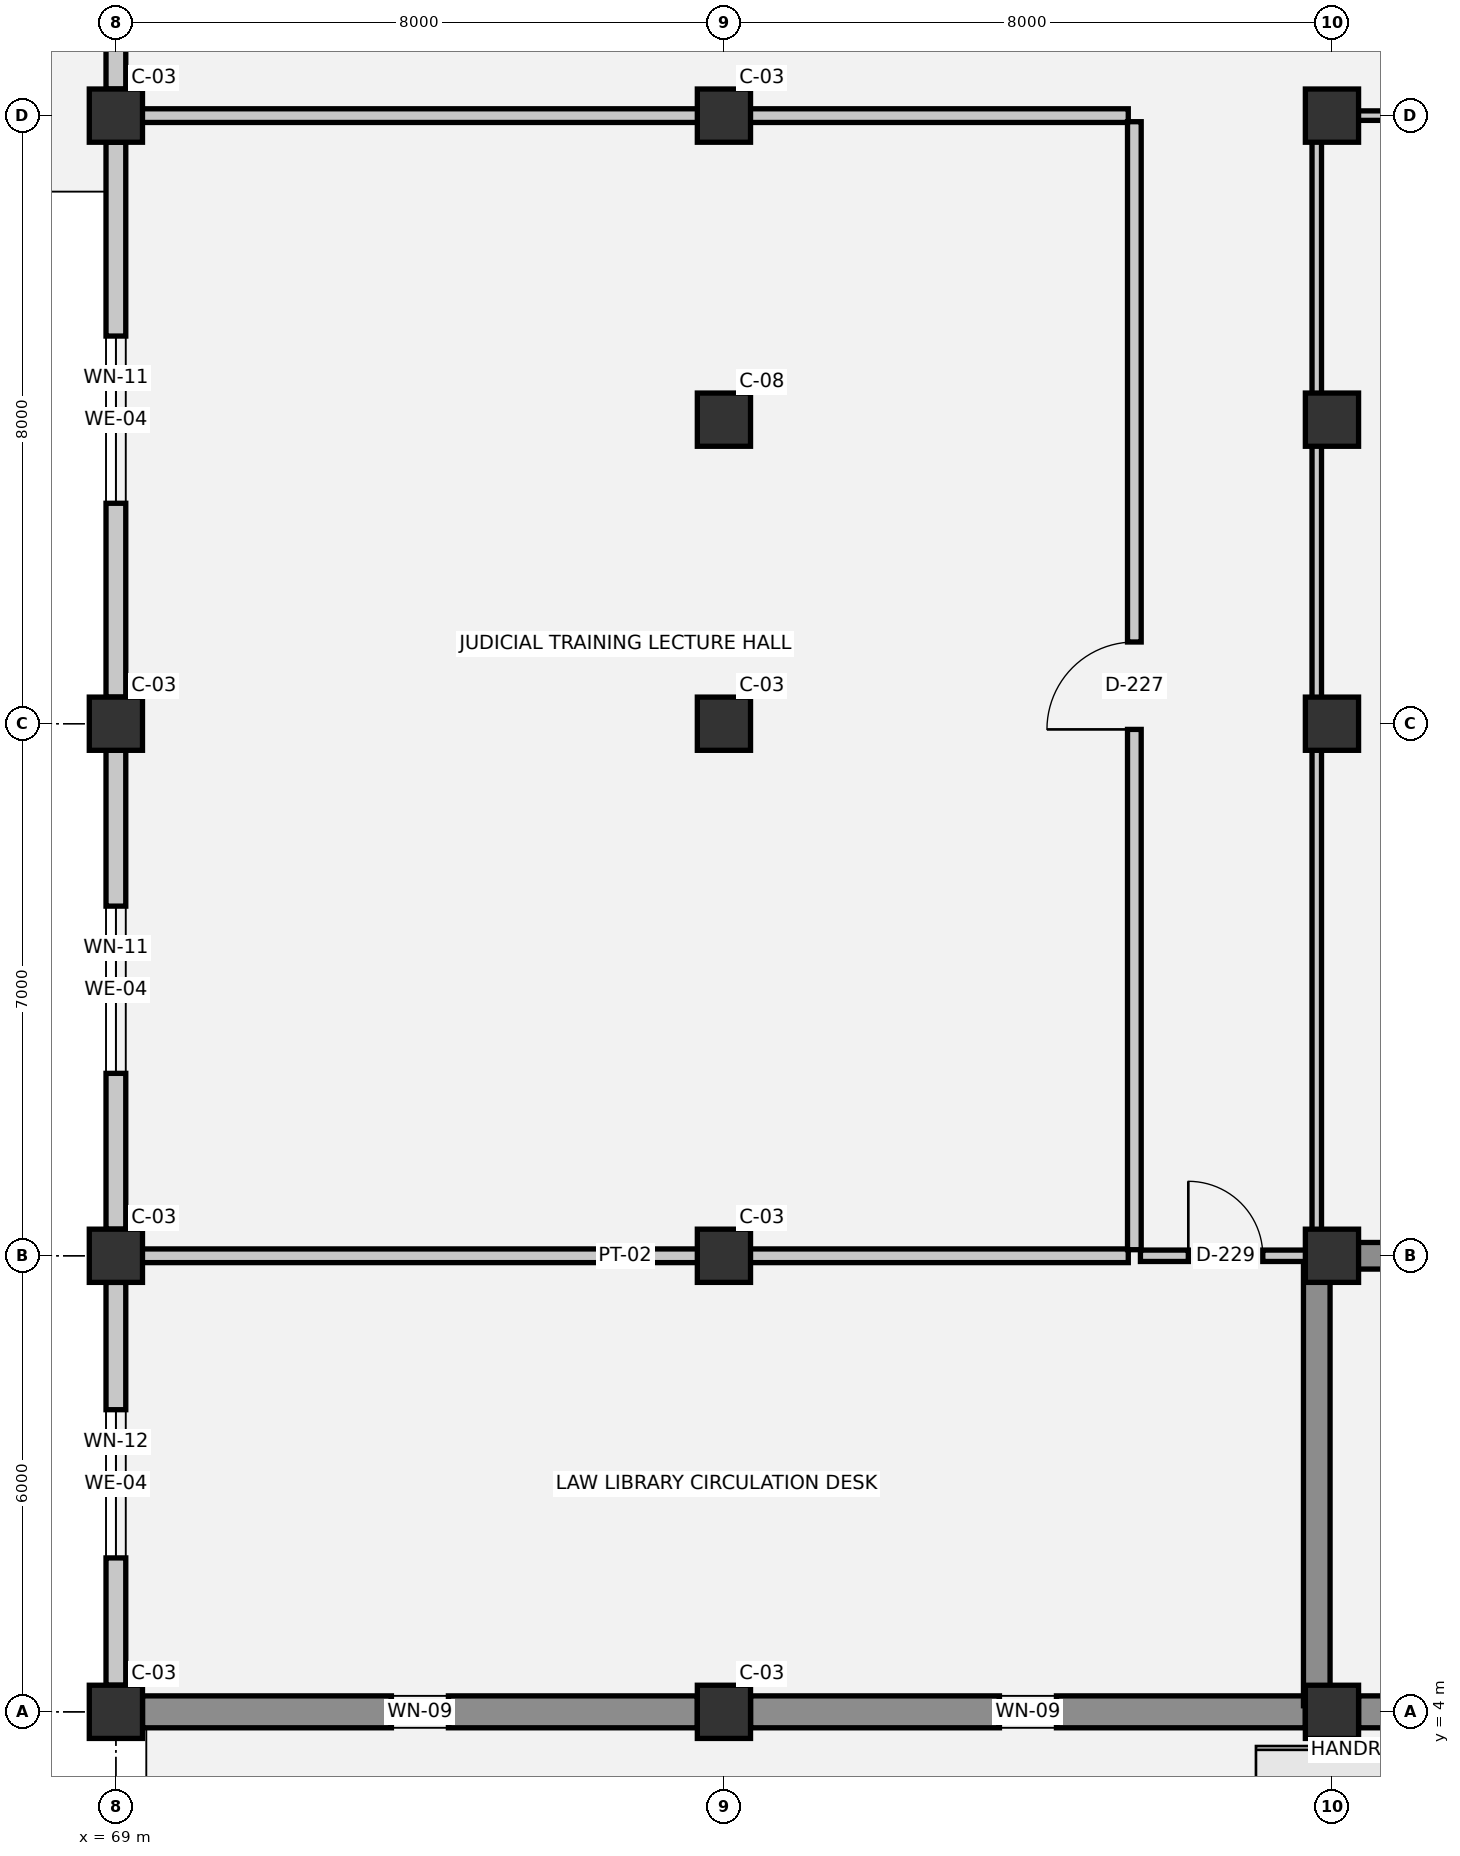
"""IFC4 building model, lengths in metres.
Left out: names, types, materials, properties, quantities, classifications, styles, units other than length and angle.
Written with IfcOpenShell. Run it as: python <this file> out.ifc"""

import sys

from ifc_helpers import new_model, si_unit, direction, frame, frame_2d, origin, origin_2d, place, context, subcontext, project, spatial, rectangle, circle, extrude, element, fill, save


model = new_model("IFC4")
c1 = context("Model", 3, precision=1e-05, world=origin(), true_north=direction((0.0, 1.0)))
c2 = subcontext(c1, "Body", "Model", "MODEL_VIEW")
j1 = project(units=[si_unit("LENGTHUNIT", "METRE"), si_unit("PLANEANGLEUNIT", "RADIAN")], contexts=[c1])
p1 = place(None, origin())
s1 = spatial("IfcSite", under=j1, at=p1, CompositionType="ELEMENT")
p2 = place(p1, origin())
s2 = spatial("IfcBuilding", under=s1, at=p2, CompositionType="ELEMENT")
p3 = place(p2, origin())
s3 = spatial("IfcBuildingStorey", under=s2, at=p3, CompositionType="ELEMENT", Elevation=0.0)
for number, where, z_axis, x_axis in (
    (1, (69.0, 4.0, 0.0), (0.0, 0.0, 1.0), (1.0, 0.0, 0.0)),
    (2, (69.0, 10.0, 0.0), (0.0, 0.0, 1.0), (1.0, 0.0, 0.0)),
    (3, (69.0, 17.0, 0.0), (0.0, 0.0, 1.0), (1.0, 0.0, 0.0)),
    (4, (69.0, 25.0, 0.0), (0.0, 0.0, 1.0), (1.0, 0.0, 0.0)),
    (5, (77.0, 4.0, 0.0), (0.0, 0.0, 1.0), (1.0, 0.0, 0.0)),
    (6, (77.0, 10.0, 0.0), (0.0, 0.0, 1.0), (1.0, 0.0, 0.0)),
    (7, (77.0, 17.0, 0.0), (0.0, 0.0, 1.0), (1.0, 0.0, 0.0)),
    (8, (77.0, 25.0, 0.0), (0.0, 0.0, 1.0), (1.0, 0.0, 0.0)),
    (9, (85.0, 4.0, 0.0), (0.0, 0.0, 1.0), (1.0, 0.0, 0.0)),
    (10, (85.0, 10.0, 0.0), (0.0, 0.0, 1.0), (1.0, 0.0, 0.0)),
    (11, (85.0, 17.0, 0.0), (0.0, 0.0, 1.0), (1.0, 0.0, 0.0)),
    (12, (85.0, 25.0, 0.0), (0.0, 0.0, 1.0), (1.0, 0.0, 0.0)),
):
    element("IfcColumn", number, at=place(p3, frame(where, z_axis=z_axis, x_axis=x_axis)), inside=s3, PredefinedType="COLUMN", context=c2, shape_type="SweptSolid", body=[
        extrude(rectangle(XDim=0.7, YDim=0.7, at=origin_2d()), origin(), (0.0, 0.0, 1.0), 5.4),
    ])
for number, where, z_axis, x_axis in (
    (13, (77.0, 21.0, 0.0), (0.0, 0.0, 1.0), (1.0, 0.0, 0.0)),
    (14, (85.0, 21.0, 0.0), (0.0, 0.0, 1.0), (1.0, 0.0, 0.0)),
):
    element("IfcColumn", number, at=place(p3, frame(where, z_axis=z_axis, x_axis=x_axis)), inside=s3, PredefinedType="COLUMN", context=c2, shape_type="SweptSolid", body=[
        extrude(circle(Radius=0.35, at=origin_2d()), origin(), (0.0, 0.0, 1.0), 5.4),
    ])
p4 = place(p3, frame((69.0, 4.35, 0.0), z_axis=(0.0, 0.0, 1.0), x_axis=(0.0, 1.0, 0.0)))
e15 = element("IfcWall", 15, at=p4, inside=s3, PredefinedType="SOLIDWALL", context=c2, shape_type="SweptSolid", body=[
    extrude(rectangle(XDim=5.3, YDim=0.26, at=frame_2d((2.65, 0.0))), origin(), (0.0, 0.0, 1.0), 4.34),
])
p5 = place(p4, frame((1.675, 0.0, 0.9)))
e16 = element("IfcOpeningElement", 16, at=p5, cuts=e15, PredefinedType="OPENING", context=c2, shape_type="SweptSolid", body=[
    extrude(rectangle(XDim=1.95, YDim=1.85, at=frame_2d((0.975, 0.925))), frame((0.0, 0.14, 0.0), z_axis=(0.0, -1.0, 0.0), x_axis=(1.0, 0.0, 0.0)), (0.0, 0.0, 1.0), 0.28),
])
p6 = place(p3, frame((69.0, 10.35, 0.0), z_axis=(0.0, 0.0, 1.0), x_axis=(0.0, 1.0, 0.0)))
e17 = element("IfcWall", 17, at=p6, inside=s3, PredefinedType="SOLIDWALL", context=c2, shape_type="SweptSolid", body=[
    extrude(rectangle(XDim=6.3, YDim=0.26, at=frame_2d((3.15, 0.0))), origin(), (0.0, 0.0, 1.0), 4.34),
])
p7 = place(p6, frame((2.05, 0.0, 0.9)))
e18 = element("IfcOpeningElement", 18, at=p7, cuts=e17, PredefinedType="OPENING", context=c2, shape_type="SweptSolid", body=[
    extrude(rectangle(XDim=2.2, YDim=1.9, at=frame_2d((1.1, 0.95))), frame((0.0, 0.14, 0.0), z_axis=(0.0, -1.0, 0.0), x_axis=(1.0, 0.0, 0.0)), (0.0, 0.0, 1.0), 0.28),
])
p8 = place(p3, frame((69.0, 17.35, 0.0), z_axis=(0.0, 0.0, 1.0), x_axis=(0.0, 1.0, 0.0)))
e19 = element("IfcWall", 19, at=p8, inside=s3, PredefinedType="SOLIDWALL", context=c2, shape_type="SweptSolid", body=[
    extrude(rectangle(XDim=7.3, YDim=0.26, at=frame_2d((3.65, 0.0))), origin(), (0.0, 0.0, 1.0), 4.34),
])
p9 = place(p8, frame((2.55, 0.0, 0.9)))
e20 = element("IfcOpeningElement", 20, at=p9, cuts=e19, PredefinedType="OPENING", context=c2, shape_type="SweptSolid", body=[
    extrude(rectangle(XDim=2.2, YDim=1.9, at=frame_2d((1.1, 0.95))), frame((0.0, 0.14, 0.0), z_axis=(0.0, -1.0, 0.0), x_axis=(1.0, 0.0, 0.0)), (0.0, 0.0, 1.0), 0.28),
])
p10 = place(p3, frame((69.0, 25.35, 0.0), z_axis=(0.0, 0.0, 1.0), x_axis=(0.0, 1.0, 0.0)))
e21 = element("IfcWall", 21, at=p10, inside=s3, PredefinedType="SOLIDWALL", context=c2, shape_type="SweptSolid", body=[
    extrude(rectangle(XDim=6.3, YDim=0.26, at=frame_2d((3.15, 0.0))), origin(), (0.0, 0.0, 1.0), 4.34),
])
p11 = place(p10, frame((1.95, 0.0, 0.0)))
e22 = element("IfcOpeningElement", 22, at=p11, cuts=e21, PredefinedType="OPENING", context=c2, shape_type="SweptSolid", body=[
    extrude(rectangle(XDim=2.4, YDim=2.4, at=frame_2d((1.2, 1.2))), frame((0.0, 0.14, 0.0), z_axis=(0.0, -1.0, 0.0), x_axis=(1.0, 0.0, 0.0)), (0.0, 0.0, 1.0), 0.28),
])
p12 = place(p3, frame((92.65, 4.0, 0.0), z_axis=(0.0, 0.0, 1.0), x_axis=(-1.0, 0.0, 0.0)))
e23 = element("IfcWall", 23, at=p12, inside=s3, PredefinedType="SOLIDWALL", context=c2, shape_type="SweptSolid", body=[
    extrude(rectangle(XDim=7.3, YDim=0.42, at=frame_2d((3.65, 0.0))), origin(), (0.0, 0.0, 1.0), 4.34),
])
p13 = place(p12, frame((3.275, 0.0, 0.9)))
e24 = element("IfcOpeningElement", 24, at=p13, cuts=e23, PredefinedType="OPENING", context=c2, shape_type="SweptSolid", body=[
    extrude(rectangle(XDim=0.75, YDim=2.2, at=frame_2d((0.375, 1.1))), frame((0.0, 0.22, 0.0), z_axis=(0.0, -1.0, 0.0), x_axis=(1.0, 0.0, 0.0)), (0.0, 0.0, 1.0), 0.44),
])
p14 = place(p3, frame((84.65, 4.0, 0.0), z_axis=(0.0, 0.0, 1.0), x_axis=(-1.0, 0.0, 0.0)))
e25 = element("IfcWall", 25, at=p14, inside=s3, PredefinedType="SOLIDWALL", context=c2, shape_type="SweptSolid", body=[
    extrude(rectangle(XDim=7.3, YDim=0.42, at=frame_2d((3.65, 0.0))), origin(), (0.0, 0.0, 1.0), 4.34),
])
p15 = place(p14, frame((3.275, 0.0, 0.9)))
e26 = element("IfcOpeningElement", 26, at=p15, cuts=e25, PredefinedType="OPENING", context=c2, shape_type="SweptSolid", body=[
    extrude(rectangle(XDim=0.75, YDim=2.2, at=frame_2d((0.375, 1.1))), frame((0.0, 0.22, 0.0), z_axis=(0.0, -1.0, 0.0), x_axis=(1.0, 0.0, 0.0)), (0.0, 0.0, 1.0), 0.44),
])
p16 = place(p3, frame((76.65, 4.0, 0.0), z_axis=(0.0, 0.0, 1.0), x_axis=(-1.0, 0.0, 0.0)))
e27 = element("IfcWall", 27, at=p16, inside=s3, PredefinedType="SOLIDWALL", context=c2, shape_type="SweptSolid", body=[
    extrude(rectangle(XDim=7.3, YDim=0.42, at=frame_2d((3.65, 0.0))), origin(), (0.0, 0.0, 1.0), 4.34),
])
p17 = place(p16, frame((3.275, 0.0, 0.9)))
e28 = element("IfcOpeningElement", 28, at=p17, cuts=e27, PredefinedType="OPENING", context=c2, shape_type="SweptSolid", body=[
    extrude(rectangle(XDim=0.75, YDim=2.2, at=frame_2d((0.375, 1.1))), frame((0.0, 0.22, 0.0), z_axis=(0.0, -1.0, 0.0), x_axis=(1.0, 0.0, 0.0)), (0.0, 0.0, 1.0), 0.44),
])
p18 = place(p3, frame((69.08, 10.0, 0.0), z_axis=(0.0, 0.0, 1.0), x_axis=(1.0, 0.0, 0.0)))
e29 = element("IfcWall", 29, at=p18, inside=s3, PredefinedType="PARTITIONING", context=c2, shape_type="SweptSolid", body=[
    extrude(rectangle(XDim=13.24, YDim=0.18, at=frame_2d((6.62, 0.0))), origin(), (0.0, 0.0, 1.0), 4.36),
])
p19 = place(p3, frame((82.48, 10.0, 0.0), z_axis=(0.0, 0.0, 1.0), x_axis=(1.0, 0.0, 0.0)))
e30 = element("IfcWall", 30, at=p19, inside=s3, PredefinedType="PARTITIONING", context=c2, shape_type="SweptSolid", body=[
    extrude(rectangle(XDim=2.24, YDim=0.15, at=frame_2d((1.12, 0.0))), origin(), (0.0, 0.0, 1.0), 4.36),
])
p20 = place(p19, frame((0.63, 0.0, 0.0)))
e31 = element("IfcOpeningElement", 31, at=p20, cuts=e30, PredefinedType="OPENING", context=c2, shape_type="SweptSolid", body=[
    extrude(rectangle(XDim=0.98, YDim=2.1, at=frame_2d((0.49, 1.05))), frame((0.0, 0.085, 0.0), z_axis=(0.0, -1.0, 0.0), x_axis=(1.0, 0.0, 0.0)), (0.0, 0.0, 1.0), 0.17),
])
p21 = place(p3, frame((84.88, 10.0, 0.0), z_axis=(0.0, 0.0, 1.0), x_axis=(1.0, 0.0, 0.0)))
e32 = element("IfcWall", 32, at=p21, inside=s3, PredefinedType="SHEAR", context=c2, shape_type="SweptSolid", body=[
    extrude(rectangle(XDim=32.04, YDim=0.35, at=frame_2d((16.02, 0.0))), origin(), (0.0, 0.0, 1.0), 5.04),
])
p22 = place(p21, frame((10.899, 0.0, 0.0)))
e33 = element("IfcOpeningElement", 33, at=p22, cuts=e32, PredefinedType="OPENING", context=c2, shape_type="SweptSolid", body=[
    extrude(rectangle(XDim=1.2, YDim=2.15, at=frame_2d((0.6, 1.075))), frame((0.0, 0.185, 0.0), z_axis=(0.0, -1.0, 0.0), x_axis=(1.0, 0.0, 0.0)), (0.0, 0.0, 1.0), 0.37),
])
p23 = place(p3, frame((69.08, 25.0, 0.0), z_axis=(0.0, 0.0, 1.0), x_axis=(1.0, 0.0, 0.0)))
e34 = element("IfcWall", 34, at=p23, inside=s3, PredefinedType="PARTITIONING", context=c2, shape_type="SweptSolid", body=[
    extrude(rectangle(XDim=13.24, YDim=0.18, at=frame_2d((6.62, 0.0))), origin(), (0.0, 0.0, 1.0), 4.36),
])
p24 = place(p3, frame((84.88, 25.0, 0.0), z_axis=(0.0, 0.0, 1.0), x_axis=(1.0, 0.0, 0.0)))
e35 = element("IfcWall", 35, at=p24, inside=s3, PredefinedType="PARTITIONING", context=c2, shape_type="SweptSolid", body=[
    extrude(rectangle(XDim=9.22, YDim=0.125, at=frame_2d((4.61, 0.0))), origin(), (0.0, 0.0, 1.0), 4.36),
])
p25 = place(p3, frame((82.4, 10.08, 0.0), z_axis=(0.0, 0.0, 1.0), x_axis=(0.0, 1.0, 0.0)))
e36 = element("IfcWall", 36, at=p25, inside=s3, PredefinedType="PARTITIONING", context=c2, shape_type="SweptSolid", body=[
    extrude(rectangle(XDim=14.84, YDim=0.18, at=frame_2d((7.42, 0.0))), origin(), (0.0, 0.0, 1.0), 5.04),
])
p26 = place(p25, frame((6.845, 0.0, 0.0)))
e37 = element("IfcOpeningElement", 37, at=p26, cuts=e36, PredefinedType="OPENING", context=c2, shape_type="SweptSolid", body=[
    extrude(rectangle(XDim=1.15, YDim=2.2, at=frame_2d((0.575, 1.1))), frame((0.0, 0.1, 0.0), z_axis=(0.0, -1.0, 0.0), x_axis=(1.0, 0.0, 0.0)), (0.0, 0.0, 1.0), 0.2),
])
p27 = place(p3, frame((84.8, 4.08, 0.0), z_axis=(0.0, 0.0, 1.0), x_axis=(0.0, 1.0, 0.0)))
e38 = element("IfcWall", 38, at=p27, inside=s3, PredefinedType="SHEAR", context=c2, shape_type="SweptSolid", body=[
    extrude(rectangle(XDim=5.84, YDim=0.35, at=frame_2d((2.92, 0.0))), origin(), (0.0, 0.0, 1.0), 5.04),
])
p28 = place(p3, frame((84.8, 10.08, 0.0), z_axis=(0.0, 0.0, 1.0), x_axis=(0.0, 1.0, 0.0)))
e39 = element("IfcWall", 39, at=p28, inside=s3, PredefinedType="PARTITIONING", context=c2, shape_type="SweptSolid", body=[
    extrude(rectangle(XDim=14.84, YDim=0.125, at=frame_2d((7.42, 0.0))), origin(), (0.0, 0.0, 1.0), 4.51),
])
p29 = place(p5, origin())
e40 = element("IfcWindow", 40, at=p29, inside=s3, PartitioningType="SINGLE_PANEL", PredefinedType="WINDOW", context=c2, shape_type="SweptSolid", body=[
    extrude(rectangle(XDim=1.95, YDim=1.85, at=frame_2d((0.975, 0.925))), frame((0.0, 0.03, 0.0), z_axis=(0.0, -1.0, 0.0), x_axis=(1.0, 0.0, 0.0)), (0.0, 0.0, 1.0), 0.06),
])
fill(e16, e40)
p30 = place(p7, origin())
e41 = element("IfcWindow", 41, at=p30, inside=s3, PartitioningType="SINGLE_PANEL", PredefinedType="WINDOW", context=c2, shape_type="SweptSolid", body=[
    extrude(rectangle(XDim=2.2, YDim=1.9, at=frame_2d((1.1, 0.95))), frame((0.0, 0.03, 0.0), z_axis=(0.0, -1.0, 0.0), x_axis=(1.0, 0.0, 0.0)), (0.0, 0.0, 1.0), 0.06),
])
fill(e18, e41)
p31 = place(p9, origin())
e42 = element("IfcWindow", 42, at=p31, inside=s3, PartitioningType="SINGLE_PANEL", PredefinedType="WINDOW", context=c2, shape_type="SweptSolid", body=[
    extrude(rectangle(XDim=2.2, YDim=1.9, at=frame_2d((1.1, 0.95))), frame((0.0, 0.03, 0.0), z_axis=(0.0, -1.0, 0.0), x_axis=(1.0, 0.0, 0.0)), (0.0, 0.0, 1.0), 0.06),
])
fill(e20, e42)
p32 = place(p15, origin())
e43 = element("IfcWindow", 43, at=p32, inside=s3, PartitioningType="SINGLE_PANEL", PredefinedType="WINDOW", context=c2, shape_type="SweptSolid", body=[
    extrude(rectangle(XDim=0.75, YDim=2.2, at=frame_2d((0.375, 1.1))), frame((0.0, 0.03, 0.0), z_axis=(0.0, -1.0, 0.0), x_axis=(1.0, 0.0, 0.0)), (0.0, 0.0, 1.0), 0.06),
])
fill(e26, e43)
p33 = place(p17, origin())
e44 = element("IfcWindow", 44, at=p33, inside=s3, PartitioningType="SINGLE_PANEL", PredefinedType="WINDOW", context=c2, shape_type="SweptSolid", body=[
    extrude(rectangle(XDim=0.75, YDim=2.2, at=frame_2d((0.375, 1.1))), frame((0.0, 0.03, 0.0), z_axis=(0.0, -1.0, 0.0), x_axis=(1.0, 0.0, 0.0)), (0.0, 0.0, 1.0), 0.06),
])
fill(e28, e44)
p34 = place(p26, origin())
e45 = element("IfcDoor", 45, at=p34, inside=s3, OperationType="SINGLE_SWING_LEFT", PredefinedType="DOOR", context=c2, shape_type="SweptSolid", body=[
    extrude(rectangle(XDim=1.15, YDim=2.2, at=frame_2d((0.575, 1.1))), frame((0.0, 0.025, 0.0), z_axis=(0.0, -1.0, 0.0), x_axis=(1.0, 0.0, 0.0)), (0.0, 0.0, 1.0), 0.05),
])
fill(e37, e45)
p35 = place(p20, origin())
e46 = element("IfcDoor", 46, at=p35, inside=s3, OperationType="SINGLE_SWING_LEFT", PredefinedType="DOOR", context=c2, shape_type="SweptSolid", body=[
    extrude(rectangle(XDim=0.98, YDim=2.1, at=frame_2d((0.49, 1.05))), frame((0.0, 0.025, 0.0), z_axis=(0.0, -1.0, 0.0), x_axis=(1.0, 0.0, 0.0)), (0.0, 0.0, 1.0), 0.05),
])
fill(e31, e46)
save(model, sys.argv[1])
